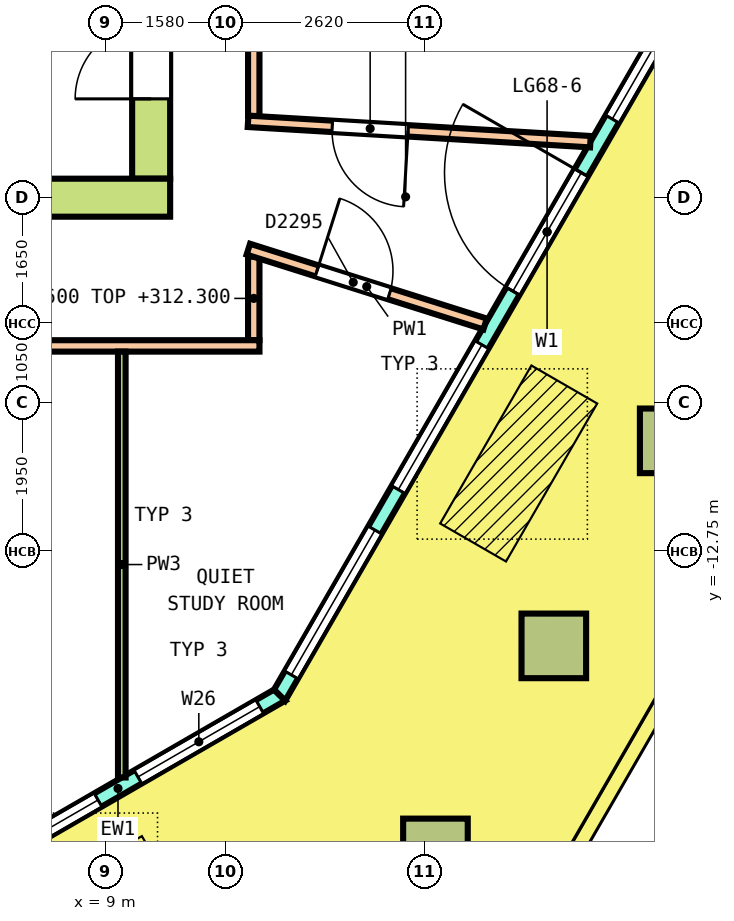
"""IFC4 building model, lengths in metres.
Left out: names, types, materials, properties, quantities, classifications, styles, units other than length and angle.
Written with IfcOpenShell. Run it as: python <this file> out.ifc"""

import sys

from ifc_helpers import new_model, si_unit, direction, frame, frame_2d, origin, origin_2d, place, context, subcontext, project, spatial, polyline, rectangle, outline, extrude, element, fill, save


model = new_model("IFC4")
c1 = context("Model", 3, precision=1e-05, world=origin(), true_north=direction((0.0, 1.0)))
c2 = subcontext(c1, "Body", "Model", "MODEL_VIEW")
j1 = project(units=[si_unit("LENGTHUNIT", "METRE"), si_unit("PLANEANGLEUNIT", "RADIAN")], contexts=[c1])
p1 = place(None, origin())
s1 = spatial("IfcSite", under=j1, at=p1, CompositionType="ELEMENT")
p2 = place(p1, origin())
s2 = spatial("IfcBuilding", under=s1, at=p2, CompositionType="ELEMENT")
p3 = place(p2, frame((0.0, 0.0, 308.6)))
s3 = spatial("IfcBuildingStorey", under=s2, at=p3, CompositionType="ELEMENT", Elevation=308.6)
p4 = place(p3, frame((13.34, -16.694, 0.0), z_axis=(-0.018115165867, -0.031417446337, 0.999342176049), x_axis=(0.499040470376, 0.865819492615, 0.036265894916)))
e1 = element("IfcColumn", 1, at=p4, inside=s3, PredefinedType="COLUMN", context=c2, shape_type="SweptSolid", body=[
    extrude(rectangle(XDim=0.85, YDim=0.85, at=origin_2d()), origin(), (0.0, 0.0, 1.0), 3.652),
])
p5 = place(p3, frame((14.898, -13.996, 0.0), z_axis=(-0.010900423214, -0.018858400897, 0.999762742599), x_axis=(0.500590318805, 0.865410234662, 0.021782067434)))
e2 = element("IfcColumn", 2, at=p5, inside=s3, PredefinedType="COLUMN", context=c2, shape_type="SweptSolid", body=[
    extrude(rectangle(XDim=0.85, YDim=0.85, at=origin_2d()), origin(), (0.0, 0.0, 1.0), 3.651),
])
p6 = place(p3, frame((16.455, -11.299, 0.0), z_axis=(-0.003611945175, -0.00628746012, 0.999973710503), x_axis=(0.497890394796, 0.867209649664, 0.007251089524)))
e3 = element("IfcColumn", 3, at=p6, inside=s3, PredefinedType="COLUMN", context=c2, shape_type="SweptSolid", body=[
    extrude(rectangle(XDim=0.85, YDim=0.85, at=origin_2d()), origin(), (0.0, 0.0, 1.0), 3.65),
])
p7 = place(p3, frame((7.037, -17.1, 0.0), z_axis=(0.0, 0.0, 1.0), x_axis=(0.86601671623, 0.500015046984, 0.0)))
e4 = element("IfcWall", 4, at=p7, inside=s3, PredefinedType="SOLIDWALL", context=c2, shape_type="SweptSolid", body=[
    extrude(outline(polyline([(-0.027, -0.1), (1.214, -0.1), (2.456, -0.1), (3.697, -0.1), (4.938, -0.1), (4.885, 0.1), (3.67, 0.1), (2.456, 0.1), (1.241, 0.1), (0.027, 0.1), (-0.027, -0.1)])), origin(), (0.0, 0.0, 1.0), 3.7),
])
p8 = place(p7, frame((0.303, 0.0, 0.1)))
e5 = element("IfcOpeningElement", 5, at=p8, cuts=e4, PredefinedType="OPENING", context=c2, shape_type="SweptSolid", body=[
    extrude(rectangle(XDim=1.85, YDim=2.9, at=frame_2d((0.925, 1.45))), frame((0.0, 0.11, 0.0), z_axis=(0.0, -1.0, 0.0), x_axis=(1.0, 0.0, 0.0)), (0.0, 0.0, 1.0), 0.22),
])
p9 = place(p7, frame((2.759, 0.0, 0.1)))
e6 = element("IfcOpeningElement", 6, at=p9, cuts=e4, PredefinedType="OPENING", context=c2, shape_type="SweptSolid", body=[
    extrude(rectangle(XDim=1.85, YDim=2.9, at=frame_2d((0.925, 1.45))), frame((0.0, 0.11, 0.0), z_axis=(0.0, -1.0, 0.0), x_axis=(1.0, 0.0, 0.0)), (0.0, 0.0, 1.0), 0.22),
])
p10 = place(p3, frame((11.291, -14.644, 0.0), z_axis=(0.0, 0.0, 1.0), x_axis=(0.499991740577, 0.866030172312, 0.0)))
e7 = element("IfcWall", 7, at=p10, inside=s3, PredefinedType="SOLIDWALL", context=c2, shape_type="SweptSolid", body=[
    extrude(outline(polyline([(-0.027, -0.1), (0.982, -0.1), (1.991, -0.1), (3.0, -0.1), (4.01, -0.1), (5.019, -0.1), (6.028, -0.1), (7.037, -0.1), (8.046, -0.1), (9.055, -0.1), (10.064, -0.1), (11.073, -0.1), (12.083, -0.1), (13.092, -0.1), (14.101, -0.1), (14.047, 0.1), (13.046, 0.1), (12.044, 0.1), (11.043, 0.1), (10.041, 0.1), (9.04, 0.1), (8.038, 0.1), (7.037, 0.1), (6.036, 0.1), (5.034, 0.1), (4.033, 0.1), (3.031, 0.1), (2.03, 0.1), (1.028, 0.1), (0.027, 0.1), (-0.027, -0.1)])), origin(), (0.0, 0.0, 1.0), 3.7),
])
p11 = place(p10, frame((0.307, 0.0, 0.1)))
e8 = element("IfcOpeningElement", 8, at=p11, cuts=e7, PredefinedType="OPENING", context=c2, shape_type="SweptSolid", body=[
    extrude(rectangle(XDim=2.2, YDim=2.9, at=frame_2d((1.1, 1.45))), frame((0.0, 0.11, 0.0), z_axis=(0.0, -1.0, 0.0), x_axis=(1.0, 0.0, 0.0)), (0.0, 0.0, 1.0), 0.22),
])
p12 = place(p10, frame((3.122, 0.0, 0.1)))
e9 = element("IfcOpeningElement", 9, at=p12, cuts=e7, PredefinedType="OPENING", context=c2, shape_type="SweptSolid", body=[
    extrude(rectangle(XDim=2.2, YDim=2.9, at=frame_2d((1.1, 1.45))), frame((0.0, 0.11, 0.0), z_axis=(0.0, -1.0, 0.0), x_axis=(1.0, 0.0, 0.0)), (0.0, 0.0, 1.0), 0.22),
])
p13 = place(p10, frame((6.137, 0.0, 0.0)))
e10 = element("IfcOpeningElement", 10, at=p13, cuts=e7, PredefinedType="OPENING", context=c2, shape_type="SweptSolid", body=[
    extrude(rectangle(XDim=1.8, YDim=2.4, at=frame_2d((0.9, 1.2))), frame((0.0, 0.11, 0.0), z_axis=(0.0, -1.0, 0.0), x_axis=(1.0, 0.0, 0.0)), (0.0, 0.0, 1.0), 0.22),
])
p14 = place(p10, frame((6.137, 0.0, 2.55)))
e11 = element("IfcOpeningElement", 11, at=p14, cuts=e7, PredefinedType="OPENING", context=c2, shape_type="SweptSolid", body=[
    extrude(rectangle(XDim=1.8, YDim=0.45, at=frame_2d((0.9, 0.225))), frame((0.0, 0.11, 0.0), z_axis=(0.0, -1.0, 0.0), x_axis=(1.0, 0.0, 0.0)), (0.0, 0.0, 1.0), 0.22),
])
p15 = place(p10, frame((8.752, 0.0, 0.1)))
e12 = element("IfcOpeningElement", 12, at=p15, cuts=e7, PredefinedType="OPENING", context=c2, shape_type="SweptSolid", body=[
    extrude(rectangle(XDim=2.2, YDim=2.9, at=frame_2d((1.1, 1.45))), frame((0.0, 0.11, 0.0), z_axis=(0.0, -1.0, 0.0), x_axis=(1.0, 0.0, 0.0)), (0.0, 0.0, 1.0), 0.22),
])
p16 = place(p10, frame((11.566, 0.0, 0.1)))
e13 = element("IfcOpeningElement", 13, at=p16, cuts=e7, PredefinedType="OPENING", context=c2, shape_type="SweptSolid", body=[
    extrude(rectangle(XDim=2.2, YDim=2.9, at=frame_2d((1.1, 1.45))), frame((0.0, 0.11, 0.0), z_axis=(0.0, -1.0, 0.0), x_axis=(1.0, 0.0, 0.0)), (0.0, 0.0, 1.0), 0.22),
])
p17 = place(p3, frame((-9.85, -8.1, 0.0), z_axis=(0.0, 0.0, 1.0), x_axis=(1.0, 0.0, 0.0)))
e14 = element("IfcWall", 14, at=p17, inside=s3, PredefinedType="SHEAR", context=c2, shape_type="SweptSolid", body=[
    extrude(rectangle(XDim=19.7, YDim=0.5, at=frame_2d((9.85, 0.0))), origin(), (0.0, 0.0, 1.0), 3.7),
])
p18 = place(p17, frame((11.4, 0.0, 0.0)))
e15 = element("IfcOpeningElement", 15, at=p18, cuts=e14, PredefinedType="OPENING", context=c2, shape_type="SweptSolid", body=[
    extrude(rectangle(XDim=1.2, YDim=2.1, at=frame_2d((0.6, 1.05))), frame((0.0, 0.26, 0.0), z_axis=(0.0, -1.0, 0.0), x_axis=(1.0, 0.0, 0.0)), (0.0, 0.0, 1.0), 0.52),
])
p19 = place(p3, frame((9.6, -7.85, 0.0), z_axis=(0.0, 0.0, 1.0), x_axis=(0.0, 1.0, 0.0)))
e16 = element("IfcWall", 16, at=p19, inside=s3, PredefinedType="SHEAR", context=c2, shape_type="SweptSolid", body=[
    extrude(rectangle(XDim=15.7, YDim=0.5, at=frame_2d((7.85, 0.0))), origin(), (0.0, 0.0, 1.0), 3.7),
])
p20 = place(p19, frame((6.65, 0.0, 0.0)))
e17 = element("IfcOpeningElement", 17, at=p20, cuts=e16, PredefinedType="OPENING", context=c2, shape_type="SweptSolid", body=[
    extrude(rectangle(XDim=2.4, YDim=2.1, at=frame_2d((1.2, 1.05))), frame((0.0, 0.26, 0.0), z_axis=(0.0, -1.0, 0.0), x_axis=(1.0, 0.0, 0.0)), (0.0, 0.0, 1.0), 0.52),
])
p21 = place(p19, frame((13.55, 0.0, 0.0)))
e18 = element("IfcOpeningElement", 18, at=p21, cuts=e16, PredefinedType="OPENING", context=c2, shape_type="SweptSolid", body=[
    extrude(rectangle(XDim=1.2, YDim=2.1, at=frame_2d((0.6, 1.05))), frame((0.0, 0.26, 0.0), z_axis=(0.0, -1.0, 0.0), x_axis=(1.0, 0.0, 0.0)), (0.0, 0.0, 1.0), 0.52),
])
p22 = place(p19, frame((1.05, 0.0, 0.0)))
e19 = element("IfcOpeningElement", 19, at=p22, cuts=e16, PredefinedType="OPENING", context=c2, shape_type="SweptSolid", body=[
    extrude(rectangle(XDim=1.0, YDim=2.1, at=frame_2d((0.5, 1.05))), frame((0.0, 0.26, 0.0), z_axis=(0.0, -1.0, 0.0), x_axis=(1.0, 0.0, 0.0)), (0.0, 0.0, 1.0), 0.52),
])
p23 = place(p3, frame((10.95, -9.975, 0.0), z_axis=(0.0, 0.0, 1.0), x_axis=(0.0, 1.0, 0.0)))
e20 = element("IfcWall", 20, at=p23, inside=s3, PredefinedType="PARTITIONING", context=c2, shape_type="SweptSolid", body=[
    extrude(rectangle(XDim=1.1, YDim=0.15, at=frame_2d((0.55, 0.0))), origin(), (0.0, 0.0, 1.0), 3.7),
])
p24 = place(p3, frame((10.95, -7.025, 0.0), z_axis=(0.0, 0.0, 1.0), x_axis=(0.0, 1.0, 0.0)))
e21 = element("IfcWall", 21, at=p24, inside=s3, PredefinedType="PARTITIONING", context=c2, shape_type="SweptSolid", body=[
    extrude(rectangle(XDim=17.0, YDim=0.15, at=frame_2d((8.5, 0.0))), origin(), (0.0, 0.0, 1.0), 3.05),
])
p25 = place(p24, frame((7.766, 0.0, 0.0)))
e22 = element("IfcOpeningElement", 22, at=p25, cuts=e21, PredefinedType="OPENING", context=c2, shape_type="SweptSolid", body=[
    extrude(rectangle(XDim=1.0, YDim=2.1, at=frame_2d((0.5, 1.05))), frame((0.0, 0.085, 0.0), z_axis=(0.0, -1.0, 0.0), x_axis=(1.0, 0.0, 0.0)), (0.0, 0.0, 1.0), 0.17),
])
p26 = place(p24, frame((10.976, 0.0, 0.0)))
e23 = element("IfcOpeningElement", 23, at=p26, cuts=e21, PredefinedType="OPENING", context=c2, shape_type="SweptSolid", body=[
    extrude(rectangle(XDim=1.0, YDim=2.1, at=frame_2d((0.5, 1.05))), frame((0.0, 0.085, 0.0), z_axis=(0.0, -1.0, 0.0), x_axis=(1.0, 0.0, 0.0)), (0.0, 0.0, 1.0), 0.17),
])
p27 = place(p24, frame((5.401, 0.0, 0.0)))
e24 = element("IfcOpeningElement", 24, at=p27, cuts=e21, PredefinedType="OPENING", context=c2, shape_type="SweptSolid", body=[
    extrude(rectangle(XDim=1.0, YDim=2.1, at=frame_2d((0.5, 1.05))), frame((0.0, 0.085, 0.0), z_axis=(0.0, -1.0, 0.0), x_axis=(1.0, 0.0, 0.0)), (0.0, 0.0, 1.0), 0.17),
])
p28 = place(p3, frame((-10.9, -10.05, 0.0), z_axis=(0.0, 0.0, 1.0), x_axis=(1.0, 0.0, 0.0)))
e25 = element("IfcWall", 25, at=p28, inside=s3, PredefinedType="PARTITIONING", context=c2, shape_type="SweptSolid", body=[
    extrude(rectangle(XDim=21.925, YDim=0.15, at=frame_2d((10.962, 0.0))), origin(), (0.0, 0.0, 1.0), 3.05),
])
p29 = place(p28, frame((1.94, 0.0, 0.0)))
e26 = element("IfcOpeningElement", 26, at=p29, cuts=e25, PredefinedType="OPENING", context=c2, shape_type="SweptSolid", body=[
    extrude(rectangle(XDim=1.0, YDim=2.1, at=frame_2d((0.5, 1.05))), frame((0.0, 0.085, 0.0), z_axis=(0.0, -1.0, 0.0), x_axis=(1.0, 0.0, 0.0)), (0.0, 0.0, 1.0), 0.17),
])
p30 = place(p28, frame((7.149, 0.0, 0.0)))
e27 = element("IfcOpeningElement", 27, at=p30, cuts=e25, PredefinedType="OPENING", context=c2, shape_type="SweptSolid", body=[
    extrude(rectangle(XDim=1.0, YDim=2.1, at=frame_2d((0.5, 1.05))), frame((0.0, 0.085, 0.0), z_axis=(0.0, -1.0, 0.0), x_axis=(1.0, 0.0, 0.0)), (0.0, 0.0, 1.0), 0.17),
])
p31 = place(p28, frame((10.569, 0.0, 0.0)))
e28 = element("IfcOpeningElement", 28, at=p31, cuts=e25, PredefinedType="OPENING", context=c2, shape_type="SweptSolid", body=[
    extrude(rectangle(XDim=1.0, YDim=2.1, at=frame_2d((0.5, 1.05))), frame((0.0, 0.085, 0.0), z_axis=(0.0, -1.0, 0.0), x_axis=(1.0, 0.0, 0.0)), (0.0, 0.0, 1.0), 0.17),
])
p32 = place(p28, frame((15.713, 0.0, 0.0)))
e29 = element("IfcOpeningElement", 29, at=p32, cuts=e25, PredefinedType="OPENING", context=c2, shape_type="SweptSolid", body=[
    extrude(rectangle(XDim=1.0, YDim=2.1, at=frame_2d((0.5, 1.05))), frame((0.0, 0.085, 0.0), z_axis=(0.0, -1.0, 0.0), x_axis=(1.0, 0.0, 0.0)), (0.0, 0.0, 1.0), 0.17),
])
p33 = place(p3, frame((10.878, -8.777, 0.0), z_axis=(0.0, 0.0, 1.0), x_axis=(0.953535222329, -0.301281562294, 0.0)))
e30 = element("IfcWall", 30, at=p33, inside=s3, PredefinedType="PARTITIONING", context=c2, shape_type="SweptSolid", body=[
    extrude(rectangle(XDim=3.267, YDim=0.15, at=frame_2d((1.634, 0.0))), origin(), (0.0, 0.0, 1.0), 3.05),
])
p34 = place(p33, frame((0.947, 0.0, 0.0)))
e31 = element("IfcOpeningElement", 31, at=p34, cuts=e30, PredefinedType="OPENING", context=c2, shape_type="SweptSolid", body=[
    extrude(rectangle(XDim=1.0, YDim=2.1, at=frame_2d((0.5, 1.05))), frame((0.0, 0.085, 0.0), z_axis=(0.0, -1.0, 0.0), x_axis=(1.0, 0.0, 0.0)), (0.0, 0.0, 1.0), 0.17),
])
p35 = place(p3, frame((10.875, -7.095, 0.0), z_axis=(0.0, 0.0, 1.0), x_axis=(0.998236474489, -0.059362791376, 0.0)))
e32 = element("IfcWall", 32, at=p35, inside=s3, PredefinedType="PARTITIONING", context=c2, shape_type="SweptSolid", body=[
    extrude(rectangle(XDim=4.512, YDim=0.15, at=frame_2d((2.256, 0.0))), origin(), (0.0, 0.0, 1.0), 3.05),
])
p36 = place(p35, frame((1.109, 0.0, 0.0)))
e33 = element("IfcOpeningElement", 33, at=p36, cuts=e32, PredefinedType="OPENING", context=c2, shape_type="SweptSolid", body=[
    extrude(rectangle(XDim=1.0, YDim=2.1, at=frame_2d((0.5, 1.05))), frame((0.0, 0.085, 0.0), z_axis=(0.0, -1.0, 0.0), x_axis=(1.0, 0.0, 0.0)), (0.0, 0.0, 1.0), 0.17),
])
p37 = place(p3, frame((9.214, -15.728, 0.0), z_axis=(0.0, 0.0, 1.0), x_axis=(0.0, 1.0, 0.0)))
e34 = element("IfcWall", 34, at=p37, inside=s3, PredefinedType="PARTITIONING", context=c2, shape_type="SweptSolid", body=[
    extrude(rectangle(XDim=5.603, YDim=0.1, at=frame_2d((2.801, 0.0))), origin(), (0.0, 0.0, 1.0), 3.05),
])
p38 = place(p8, origin())
e35 = element("IfcWindow", 35, at=p38, inside=s3, PartitioningType="SINGLE_PANEL", PredefinedType="WINDOW", context=c2, shape_type="SweptSolid", body=[
    extrude(rectangle(XDim=1.85, YDim=2.9, at=frame_2d((0.925, 1.45))), frame((0.0, 0.03, 0.0), z_axis=(0.0, -1.0, 0.0), x_axis=(1.0, 0.0, 0.0)), (0.0, 0.0, 1.0), 0.06),
])
fill(e5, e35)
p39 = place(p9, origin())
e36 = element("IfcWindow", 36, at=p39, inside=s3, PartitioningType="SINGLE_PANEL", PredefinedType="WINDOW", context=c2, shape_type="SweptSolid", body=[
    extrude(rectangle(XDim=1.85, YDim=2.9, at=frame_2d((0.925, 1.45))), frame((0.0, 0.03, 0.0), z_axis=(0.0, -1.0, 0.0), x_axis=(1.0, 0.0, 0.0)), (0.0, 0.0, 1.0), 0.06),
])
fill(e6, e36)
p40 = place(p11, origin())
e37 = element("IfcWindow", 37, at=p40, inside=s3, PartitioningType="SINGLE_PANEL", PredefinedType="WINDOW", context=c2, shape_type="SweptSolid", body=[
    extrude(rectangle(XDim=2.2, YDim=2.9, at=frame_2d((1.1, 1.45))), frame((0.0, 0.03, 0.0), z_axis=(0.0, -1.0, 0.0), x_axis=(1.0, 0.0, 0.0)), (0.0, 0.0, 1.0), 0.06),
])
fill(e8, e37)
p41 = place(p12, origin())
e38 = element("IfcWindow", 38, at=p41, inside=s3, PartitioningType="SINGLE_PANEL", PredefinedType="WINDOW", context=c2, shape_type="SweptSolid", body=[
    extrude(rectangle(XDim=2.2, YDim=2.9, at=frame_2d((1.1, 1.45))), frame((0.0, 0.03, 0.0), z_axis=(0.0, -1.0, 0.0), x_axis=(1.0, 0.0, 0.0)), (0.0, 0.0, 1.0), 0.06),
])
fill(e9, e38)
p42 = place(p13, origin())
e39 = element("IfcDoor", 39, at=p42, inside=s3, OperationType="DOUBLE_DOOR_SINGLE_SWING", PredefinedType="DOOR", context=c2, shape_type="SweptSolid", body=[
    extrude(rectangle(XDim=1.8, YDim=2.4, at=frame_2d((0.9, 1.2))), frame((0.0, 0.025, 0.0), z_axis=(0.0, -1.0, 0.0), x_axis=(1.0, 0.0, 0.0)), (0.0, 0.0, 1.0), 0.05),
])
fill(e10, e39)
p43 = place(p14, origin())
e40 = element("IfcWindow", 40, at=p43, inside=s3, PartitioningType="SINGLE_PANEL", PredefinedType="WINDOW", context=c2, shape_type="SweptSolid", body=[
    extrude(rectangle(XDim=1.8, YDim=0.45, at=frame_2d((0.9, 0.225))), frame((0.0, 0.03, 0.0), z_axis=(0.0, -1.0, 0.0), x_axis=(1.0, 0.0, 0.0)), (0.0, 0.0, 1.0), 0.06),
])
fill(e11, e40)
p44 = place(p15, origin())
e41 = element("IfcWindow", 41, at=p44, inside=s3, PartitioningType="SINGLE_PANEL", PredefinedType="WINDOW", context=c2, shape_type="SweptSolid", body=[
    extrude(rectangle(XDim=2.2, YDim=2.9, at=frame_2d((1.1, 1.45))), frame((0.0, 0.03, 0.0), z_axis=(0.0, -1.0, 0.0), x_axis=(1.0, 0.0, 0.0)), (0.0, 0.0, 1.0), 0.06),
])
fill(e12, e41)
p45 = place(p22, origin())
e42 = element("IfcDoor", 42, at=p45, inside=s3, OperationType="SINGLE_SWING_RIGHT", PredefinedType="DOOR", context=c2, shape_type="SweptSolid", body=[
    extrude(rectangle(XDim=1.0, YDim=2.1, at=frame_2d((0.5, 1.05))), frame((0.0, 0.2, 0.0), z_axis=(0.0, -1.0, 0.0), x_axis=(1.0, 0.0, 0.0)), (0.0, 0.0, 1.0), 0.4),
])
fill(e19, e42)
p46 = place(p34, origin())
e43 = element("IfcDoor", 43, at=p46, inside=s3, OperationType="SINGLE_SWING_RIGHT", PredefinedType="DOOR", context=c2, shape_type="SweptSolid", body=[
    extrude(rectangle(XDim=1.0, YDim=2.1, at=frame_2d((0.5, 1.05))), frame((0.0, 0.025, 0.0), z_axis=(0.0, -1.0, 0.0), x_axis=(1.0, 0.0, 0.0)), (0.0, 0.0, 1.0), 0.05),
])
fill(e31, e43)
p47 = place(p36, origin())
e44 = element("IfcDoor", 44, at=p47, inside=s3, OperationType="SINGLE_SWING_RIGHT", PredefinedType="DOOR", context=c2, shape_type="SweptSolid", body=[
    extrude(rectangle(XDim=1.0, YDim=2.1, at=frame_2d((0.5, 1.05))), frame((0.0, 0.025, 0.0), z_axis=(0.0, -1.0, 0.0), x_axis=(1.0, 0.0, 0.0)), (0.0, 0.0, 1.0), 0.05),
])
fill(e33, e44)
save(model, sys.argv[1])
